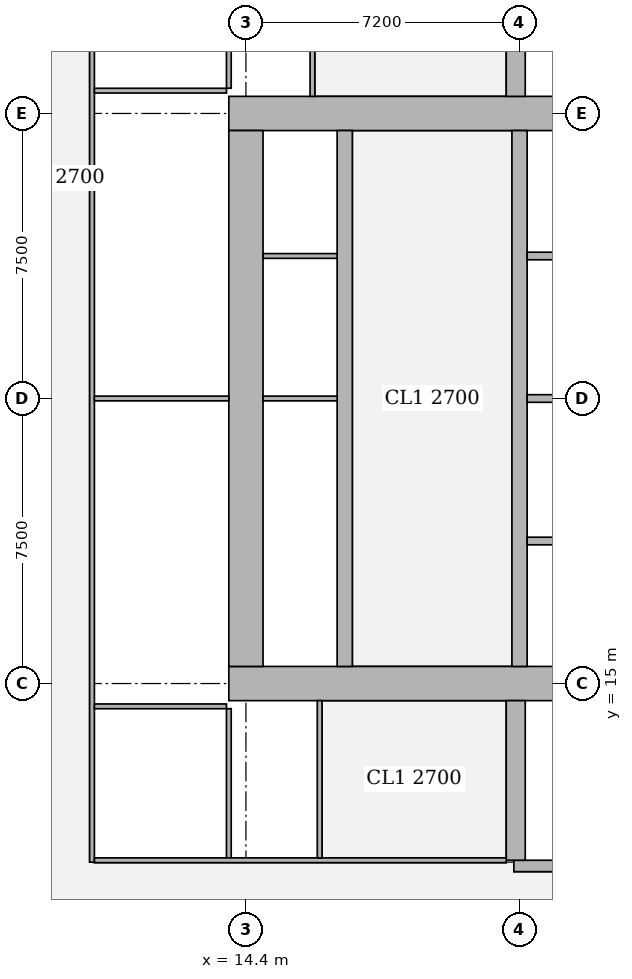
"""IFC4 building model, lengths in metres.
Left out: names, types, materials, properties, quantities, classifications, styles, units other than length and angle.
Written with IfcOpenShell. Run it as: python <this file> out.ifc"""

import sys

from ifc_helpers import new_model, si_unit, direction, frame, frame_2d, origin, place, context, subcontext, project, spatial, rectangle, extrude, element, fill, save


model = new_model("IFC4")
c1 = context("Model", 3, precision=1e-05, world=origin(), true_north=direction((0.0, 1.0)))
c2 = subcontext(c1, "Body", "Model", "MODEL_VIEW")
j1 = project(units=[si_unit("LENGTHUNIT", "METRE"), si_unit("PLANEANGLEUNIT", "RADIAN")], contexts=[c1])
p1 = place(None, origin())
s1 = spatial("IfcSite", under=j1, at=p1, CompositionType="ELEMENT")
p2 = place(p1, origin())
s2 = spatial("IfcBuilding", under=s1, at=p2, CompositionType="ELEMENT")
p3 = place(p2, frame((0.0, 0.0, 180.8)))
s3 = spatial("IfcBuildingStorey", under=s2, at=p3, CompositionType="ELEMENT", Elevation=180.8)
p4 = place(p3, frame((13.95, 15.0, 0.0), z_axis=(0.0, 0.0, 1.0), x_axis=(1.0, 0.0, 0.0)))
e1 = element("IfcWall", 1, at=p4, inside=s3, PredefinedType="SHEAR", context=c2, shape_type="SweptSolid", body=[
    extrude(rectangle(XDim=15.3, YDim=0.9, at=frame_2d((7.65, 0.0))), origin(), (0.0, 0.0, 1.0), 3.75),
])
p5 = place(p4, frame((4.45, 0.0, 0.0)))
e2 = element("IfcOpeningElement", 2, at=p5, cuts=e1, PredefinedType="OPENING", context=c2, shape_type="SweptSolid", body=[
    extrude(rectangle(XDim=1.8, YDim=2.1, at=frame_2d((0.9, 1.05))), frame((0.0, 0.46, 0.0), z_axis=(0.0, -1.0, 0.0), x_axis=(1.0, 0.0, 0.0)), (0.0, 0.0, 1.0), 0.92),
])
p6 = place(p4, frame((10.7, 0.0, 0.0)))
e3 = element("IfcOpeningElement", 3, at=p6, cuts=e1, PredefinedType="OPENING", context=c2, shape_type="SweptSolid", body=[
    extrude(rectangle(XDim=1.1, YDim=2.1, at=frame_2d((0.55, 1.05))), frame((0.0, 0.46, 0.0), z_axis=(0.0, -1.0, 0.0), x_axis=(1.0, 0.0, 0.0)), (0.0, 0.0, 1.0), 0.92),
])
p7 = place(p3, frame((13.95, 30.0, 0.0), z_axis=(0.0, 0.0, 1.0), x_axis=(1.0, 0.0, 0.0)))
e4 = element("IfcWall", 4, at=p7, inside=s3, PredefinedType="SHEAR", context=c2, shape_type="SweptSolid", body=[
    extrude(rectangle(XDim=15.3, YDim=0.9, at=frame_2d((7.65, 0.0))), origin(), (0.0, 0.0, 1.0), 3.75),
])
p8 = place(p7, frame((4.45, 0.0, 0.0)))
e5 = element("IfcOpeningElement", 5, at=p8, cuts=e4, PredefinedType="OPENING", context=c2, shape_type="SweptSolid", body=[
    extrude(rectangle(XDim=1.8, YDim=2.1, at=frame_2d((0.9, 1.05))), frame((0.0, 0.46, 0.0), z_axis=(0.0, -1.0, 0.0), x_axis=(1.0, 0.0, 0.0)), (0.0, 0.0, 1.0), 0.92),
])
p9 = place(p7, frame((10.7, 0.0, 0.0)))
e6 = element("IfcOpeningElement", 6, at=p9, cuts=e4, PredefinedType="OPENING", context=c2, shape_type="SweptSolid", body=[
    extrude(rectangle(XDim=1.1, YDim=2.1, at=frame_2d((0.55, 1.05))), frame((0.0, 0.46, 0.0), z_axis=(0.0, -1.0, 0.0), x_axis=(1.0, 0.0, 0.0)), (0.0, 0.0, 1.0), 0.92),
])
p10 = place(p3, frame((14.4, 15.45, 0.0), z_axis=(0.0, 0.0, 1.0), x_axis=(0.0, 1.0, 0.0)))
e7 = element("IfcWall", 7, at=p10, inside=s3, PredefinedType="SHEAR", context=c2, shape_type="SweptSolid", body=[
    extrude(rectangle(XDim=14.1, YDim=0.9, at=frame_2d((7.05, 0.0))), origin(), (0.0, 0.0, 1.0), 3.75),
])
p11 = place(p3, frame((17.0, 15.45, 0.0), z_axis=(0.0, 0.0, 1.0), x_axis=(0.0, 1.0, 0.0)))
e8 = element("IfcWall", 8, at=p11, inside=s3, PredefinedType="SHEAR", context=c2, shape_type="SweptSolid", body=[
    extrude(rectangle(XDim=14.1, YDim=0.4, at=frame_2d((7.05, 0.0))), origin(), (0.0, 0.0, 1.0), 3.75),
])
p12 = place(p11, frame((0.925, 0.0, 0.0)))
e9 = element("IfcOpeningElement", 9, at=p12, cuts=e8, PredefinedType="OPENING", context=c2, shape_type="SweptSolid", body=[
    extrude(rectangle(XDim=1.0, YDim=2.1, at=frame_2d((0.5, 1.05))), frame((0.0, 0.21, 0.0), z_axis=(0.0, -1.0, 0.0), x_axis=(1.0, 0.0, 0.0)), (0.0, 0.0, 1.0), 0.42),
])
p13 = place(p11, frame((4.675, 0.0, 0.0)))
e10 = element("IfcOpeningElement", 10, at=p13, cuts=e8, PredefinedType="OPENING", context=c2, shape_type="SweptSolid", body=[
    extrude(rectangle(XDim=1.0, YDim=2.1, at=frame_2d((0.5, 1.05))), frame((0.0, 0.21, 0.0), z_axis=(0.0, -1.0, 0.0), x_axis=(1.0, 0.0, 0.0)), (0.0, 0.0, 1.0), 0.42),
])
p14 = place(p11, frame((8.425, 0.0, 0.0)))
e11 = element("IfcOpeningElement", 11, at=p14, cuts=e8, PredefinedType="OPENING", context=c2, shape_type="SweptSolid", body=[
    extrude(rectangle(XDim=1.0, YDim=2.1, at=frame_2d((0.5, 1.05))), frame((0.0, 0.21, 0.0), z_axis=(0.0, -1.0, 0.0), x_axis=(1.0, 0.0, 0.0)), (0.0, 0.0, 1.0), 0.42),
])
p15 = place(p11, frame((12.175, 0.0, 0.0)))
e12 = element("IfcOpeningElement", 12, at=p15, cuts=e8, PredefinedType="OPENING", context=c2, shape_type="SweptSolid", body=[
    extrude(rectangle(XDim=1.0, YDim=2.1, at=frame_2d((0.5, 1.05))), frame((0.0, 0.21, 0.0), z_axis=(0.0, -1.0, 0.0), x_axis=(1.0, 0.0, 0.0)), (0.0, 0.0, 1.0), 0.42),
])
p16 = place(p3, frame((21.6, 15.45, 0.0), z_axis=(0.0, 0.0, 1.0), x_axis=(0.0, 1.0, 0.0)))
e13 = element("IfcWall", 13, at=p16, inside=s3, PredefinedType="SHEAR", context=c2, shape_type="SweptSolid", body=[
    extrude(rectangle(XDim=14.1, YDim=0.4, at=frame_2d((7.05, 0.0))), origin(), (0.0, 0.0, 1.0), 3.75),
])
p17 = place(p16, frame((0.875, 0.0, 0.0)))
e14 = element("IfcOpeningElement", 14, at=p17, cuts=e13, PredefinedType="OPENING", context=c2, shape_type="SweptSolid", body=[
    extrude(rectangle(XDim=1.1, YDim=2.1, at=frame_2d((0.55, 1.05))), frame((0.0, 0.21, 0.0), z_axis=(0.0, -1.0, 0.0), x_axis=(1.0, 0.0, 0.0)), (0.0, 0.0, 1.0), 0.42),
])
p18 = place(p16, frame((4.625, 0.0, 0.0)))
e15 = element("IfcOpeningElement", 15, at=p18, cuts=e13, PredefinedType="OPENING", context=c2, shape_type="SweptSolid", body=[
    extrude(rectangle(XDim=1.1, YDim=2.1, at=frame_2d((0.55, 1.05))), frame((0.0, 0.21, 0.0), z_axis=(0.0, -1.0, 0.0), x_axis=(1.0, 0.0, 0.0)), (0.0, 0.0, 1.0), 0.42),
])
p19 = place(p16, frame((8.375, 0.0, 0.0)))
e16 = element("IfcOpeningElement", 16, at=p19, cuts=e13, PredefinedType="OPENING", context=c2, shape_type="SweptSolid", body=[
    extrude(rectangle(XDim=1.1, YDim=2.1, at=frame_2d((0.55, 1.05))), frame((0.0, 0.21, 0.0), z_axis=(0.0, -1.0, 0.0), x_axis=(1.0, 0.0, 0.0)), (0.0, 0.0, 1.0), 0.42),
])
p20 = place(p16, frame((12.125, 0.0, 0.0)))
e17 = element("IfcOpeningElement", 17, at=p20, cuts=e13, PredefinedType="OPENING", context=c2, shape_type="SweptSolid", body=[
    extrude(rectangle(XDim=1.1, YDim=2.1, at=frame_2d((0.55, 1.05))), frame((0.0, 0.21, 0.0), z_axis=(0.0, -1.0, 0.0), x_axis=(1.0, 0.0, 0.0)), (0.0, 0.0, 1.0), 0.42),
])
p21 = place(p3, frame((21.45, 10.2, 0.0), z_axis=(0.0, 0.0, 1.0), x_axis=(1.0, 0.0, 0.0)))
e18 = element("IfcWall", 18, at=p21, inside=s3, PredefinedType="SHEAR", context=c2, shape_type="SweptSolid", body=[
    extrude(rectangle(XDim=7.5, YDim=0.3, at=frame_2d((3.75, 0.0))), origin(), (0.0, 0.0, 1.0), 3.75),
])
p22 = place(p21, frame((0.5, 0.0, 0.0)))
e19 = element("IfcOpeningElement", 19, at=p22, cuts=e18, PredefinedType="OPENING", context=c2, shape_type="SweptSolid", body=[
    extrude(rectangle(XDim=1.1, YDim=2.1, at=frame_2d((0.55, 1.05))), frame((0.0, 0.16, 0.0), z_axis=(0.0, -1.0, 0.0), x_axis=(1.0, 0.0, 0.0)), (0.0, 0.0, 1.0), 0.32),
])
for number, where, z_axis, x_axis in (
    (20, (21.5, 10.35, 0.0), (0.0, 0.0, 1.0), (0.0, 1.0, 0.0)),
    (21, (21.5, 30.45, 0.0), (0.0, 0.0, 1.0), (0.0, 1.0, 0.0)),
):
    element("IfcWall", number, at=place(p3, frame(where, z_axis=z_axis, x_axis=x_axis)), inside=s3, PredefinedType="SHEAR", context=c2, shape_type="SweptSolid", body=[
        extrude(rectangle(XDim=4.2, YDim=0.5, at=frame_2d((2.1, 0.0))), origin(), (0.0, 0.0, 1.0), 3.75),
    ])
p23 = place(p3, frame((10.35, 10.3, 0.0), z_axis=(0.0, 0.0, 1.0), x_axis=(0.0, 1.0, 0.0)))
e22 = element("IfcWall", 22, at=p23, inside=s3, PredefinedType="PARTITIONING", context=c2, shape_type="SweptSolid", body=[
    extrude(rectangle(XDim=24.4, YDim=0.125, at=frame_2d((12.2, 0.0))), origin(), (0.0, 0.0, 1.0), 3.5),
])
p24 = place(p23, frame((1.55, 0.0, 0.0)))
e23 = element("IfcOpeningElement", 23, at=p24, cuts=e22, PredefinedType="OPENING", context=c2, shape_type="SweptSolid", body=[
    extrude(rectangle(XDim=1.0, YDim=2.1, at=frame_2d((0.5, 1.05))), frame((0.0, 0.073, 0.0), z_axis=(0.0, -1.0, 0.0), x_axis=(1.0, 0.0, 0.0)), (0.0, 0.0, 1.0), 0.145),
])
p25 = place(p23, frame((7.65, 0.0, 0.0)))
e24 = element("IfcOpeningElement", 24, at=p25, cuts=e22, PredefinedType="OPENING", context=c2, shape_type="SweptSolid", body=[
    extrude(rectangle(XDim=1.0, YDim=2.1, at=frame_2d((0.5, 1.05))), frame((0.0, 0.073, 0.0), z_axis=(0.0, -1.0, 0.0), x_axis=(1.0, 0.0, 0.0)), (0.0, 0.0, 1.0), 0.145),
])
p26 = place(p23, frame((15.75, 0.0, 0.0)))
e25 = element("IfcOpeningElement", 25, at=p26, cuts=e22, PredefinedType="OPENING", context=c2, shape_type="SweptSolid", body=[
    extrude(rectangle(XDim=1.0, YDim=2.1, at=frame_2d((0.5, 1.05))), frame((0.0, 0.073, 0.0), z_axis=(0.0, -1.0, 0.0), x_axis=(1.0, 0.0, 0.0)), (0.0, 0.0, 1.0), 0.145),
])
p27 = place(p23, frame((21.85, 0.0, 0.0)))
e26 = element("IfcOpeningElement", 26, at=p27, cuts=e22, PredefinedType="OPENING", context=c2, shape_type="SweptSolid", body=[
    extrude(rectangle(XDim=1.0, YDim=2.1, at=frame_2d((0.5, 1.05))), frame((0.0, 0.073, 0.0), z_axis=(0.0, -1.0, 0.0), x_axis=(1.0, 0.0, 0.0)), (0.0, 0.0, 1.0), 0.145),
])
p28 = place(p3, frame((10.413, 14.4, 0.0), z_axis=(0.0, 0.0, 1.0), x_axis=(1.0, 0.0, 0.0)))
e27 = element("IfcWall", 27, at=p28, inside=s3, PredefinedType="PARTITIONING", context=c2, shape_type="SweptSolid", body=[
    extrude(rectangle(XDim=3.475, YDim=0.125, at=frame_2d((1.737, 0.0))), origin(), (0.0, 0.0, 1.0), 3.5),
])
p29 = place(p3, frame((10.413, 22.5, 0.0), z_axis=(0.0, 0.0, 1.0), x_axis=(1.0, 0.0, 0.0)))
e28 = element("IfcWall", 28, at=p29, inside=s3, PredefinedType="PARTITIONING", context=c2, shape_type="SweptSolid", body=[
    extrude(rectangle(XDim=3.537, YDim=0.125, at=frame_2d((1.769, 0.0))), origin(), (0.0, 0.0, 1.0), 3.5),
])
p30 = place(p3, frame((10.413, 30.6, 0.0), z_axis=(0.0, 0.0, 1.0), x_axis=(1.0, 0.0, 0.0)))
e29 = element("IfcWall", 29, at=p30, inside=s3, PredefinedType="PARTITIONING", context=c2, shape_type="SweptSolid", body=[
    extrude(rectangle(XDim=3.475, YDim=0.125, at=frame_2d((1.737, 0.0))), origin(), (0.0, 0.0, 1.0), 3.5),
])
p31 = place(p3, frame((13.95, 10.413, 0.0), z_axis=(0.0, 0.0, 1.0), x_axis=(0.0, 1.0, 0.0)))
e30 = element("IfcWall", 30, at=p31, inside=s3, PredefinedType="PARTITIONING", context=c2, shape_type="SweptSolid", body=[
    extrude(rectangle(XDim=3.925, YDim=0.125, at=frame_2d((1.962, 0.0))), origin(), (0.0, 0.0, 1.0), 3.5),
])
p32 = place(p3, frame((13.95, 30.663, 0.0), z_axis=(0.0, 0.0, 1.0), x_axis=(0.0, 1.0, 0.0)))
e31 = element("IfcWall", 31, at=p32, inside=s3, PredefinedType="PARTITIONING", context=c2, shape_type="SweptSolid", body=[
    extrude(rectangle(XDim=3.924, YDim=0.125, at=frame_2d((1.962, 0.0))), origin(), (0.0, 0.0, 1.0), 3.5),
])
p33 = place(p3, frame((10.413, 10.35, 0.0), z_axis=(0.0, 0.0, 1.0), x_axis=(1.0, 0.0, 0.0)))
e32 = element("IfcWall", 32, at=p33, inside=s3, PredefinedType="PARTITIONING", context=c2, shape_type="SweptSolid", body=[
    extrude(rectangle(XDim=10.837, YDim=0.125, at=frame_2d((5.418, 0.0))), origin(), (0.0, 0.0, 1.0), 3.5),
])
p34 = place(p33, frame((7.582, 0.0, 0.0)))
e33 = element("IfcOpeningElement", 33, at=p34, cuts=e32, PredefinedType="OPENING", context=c2, shape_type="SweptSolid", body=[
    extrude(rectangle(XDim=1.8, YDim=2.1, at=frame_2d((0.9, 1.05))), frame((0.0, 0.073, 0.0), z_axis=(0.0, -1.0, 0.0), x_axis=(1.0, 0.0, 0.0)), (0.0, 0.0, 1.0), 0.145),
])
p35 = place(p3, frame((16.34, 10.413, 0.0), z_axis=(0.0, 0.0, 1.0), x_axis=(0.0, 1.0, 0.0)))
e34 = element("IfcWall", 34, at=p35, inside=s3, PredefinedType="PARTITIONING", context=c2, shape_type="SweptSolid", body=[
    extrude(rectangle(XDim=4.137, YDim=0.125, at=frame_2d((2.068, 0.0))), origin(), (0.0, 0.0, 1.0), 3.5),
])
p36 = place(p35, frame((1.512, 0.0, 0.0)))
e35 = element("IfcOpeningElement", 35, at=p36, cuts=e34, PredefinedType="OPENING", context=c2, shape_type="SweptSolid", body=[
    extrude(rectangle(XDim=1.0, YDim=2.1, at=frame_2d((0.5, 1.05))), frame((0.0, 0.073, 0.0), z_axis=(0.0, -1.0, 0.0), x_axis=(1.0, 0.0, 0.0)), (0.0, 0.0, 1.0), 0.145),
])
p37 = place(p3, frame((16.15, 30.45, 0.0), z_axis=(0.0, 0.0, 1.0), x_axis=(0.0, 1.0, 0.0)))
e36 = element("IfcWall", 36, at=p37, inside=s3, PredefinedType="PARTITIONING", context=c2, shape_type="SweptSolid", body=[
    extrude(rectangle(XDim=4.137, YDim=0.125, at=frame_2d((2.068, 0.0))), origin(), (0.0, 0.0, 1.0), 3.5),
])
p38 = place(p37, frame((1.625, 0.0, 0.0)))
e37 = element("IfcOpeningElement", 37, at=p38, cuts=e36, PredefinedType="OPENING", context=c2, shape_type="SweptSolid", body=[
    extrude(rectangle(XDim=1.0, YDim=2.1, at=frame_2d((0.5, 1.05))), frame((0.0, 0.073, 0.0), z_axis=(0.0, -1.0, 0.0), x_axis=(1.0, 0.0, 0.0)), (0.0, 0.0, 1.0), 0.145),
])
for number, where, z_axis, x_axis in (
    (38, (14.85, 22.5, 0.0), (0.0, 0.0, 1.0), (1.0, 0.0, 0.0)),
    (39, (14.85, 26.25, 0.0), (0.0, 0.0, 1.0), (1.0, 0.0, 0.0)),
):
    element("IfcWall", number, at=place(p3, frame(where, z_axis=z_axis, x_axis=x_axis)), inside=s3, PredefinedType="PARTITIONING", context=c2, shape_type="SweptSolid", body=[
        extrude(rectangle(XDim=1.95, YDim=0.125, at=frame_2d((0.975, 0.0))), origin(), (0.0, 0.0, 1.0), 3.5),
    ])
for number, where, z_axis, x_axis in (
    (40, (21.8, 18.75, 0.0), (0.0, 0.0, 1.0), (1.0, 0.0, 0.0)),
    (41, (21.8, 22.5, 0.0), (0.0, 0.0, 1.0), (1.0, 0.0, 0.0)),
    (42, (21.8, 26.25, 0.0), (0.0, 0.0, 1.0), (1.0, 0.0, 0.0)),
):
    element("IfcWall", number, at=place(p3, frame(where, z_axis=z_axis, x_axis=x_axis)), inside=s3, PredefinedType="SOLIDWALL", context=c2, shape_type="SweptSolid", body=[
        extrude(rectangle(XDim=2.2, YDim=0.2, at=frame_2d((1.1, 0.0))), origin(), (0.0, 0.0, 1.0), 3.5),
    ])
p39 = place(p24, origin())
e43 = element("IfcDoor", 43, at=p39, inside=s3, OperationType="SINGLE_SWING_RIGHT", PredefinedType="DOOR", context=c2, shape_type="SweptSolid", body=[
    extrude(rectangle(XDim=1.0, YDim=2.1, at=frame_2d((0.5, 1.05))), frame((0.0, 0.025, 0.0), z_axis=(0.0, -1.0, 0.0), x_axis=(1.0, 0.0, 0.0)), (0.0, 0.0, 1.0), 0.05),
])
fill(e23, e43)
p40 = place(p25, origin())
e44 = element("IfcDoor", 44, at=p40, inside=s3, OperationType="SINGLE_SWING_LEFT", PredefinedType="DOOR", context=c2, shape_type="SweptSolid", body=[
    extrude(rectangle(XDim=1.0, YDim=2.1, at=frame_2d((0.5, 1.05))), frame((0.0, 0.025, 0.0), z_axis=(0.0, -1.0, 0.0), x_axis=(1.0, 0.0, 0.0)), (0.0, 0.0, 1.0), 0.05),
])
fill(e24, e44)
p41 = place(p26, origin())
e45 = element("IfcDoor", 45, at=p41, inside=s3, OperationType="SINGLE_SWING_LEFT", PredefinedType="DOOR", context=c2, shape_type="SweptSolid", body=[
    extrude(rectangle(XDim=1.0, YDim=2.1, at=frame_2d((0.5, 1.05))), frame((0.0, 0.025, 0.0), z_axis=(0.0, -1.0, 0.0), x_axis=(1.0, 0.0, 0.0)), (0.0, 0.0, 1.0), 0.05),
])
fill(e25, e45)
p42 = place(p36, origin())
e46 = element("IfcDoor", 46, at=p42, inside=s3, OperationType="SINGLE_SWING_LEFT", PredefinedType="DOOR", context=c2, shape_type="SweptSolid", body=[
    extrude(rectangle(XDim=1.0, YDim=2.1, at=frame_2d((0.5, 1.05))), frame((0.0, 0.025, 0.0), z_axis=(0.0, -1.0, 0.0), x_axis=(1.0, 0.0, 0.0)), (0.0, 0.0, 1.0), 0.05),
])
fill(e35, e46)
p43 = place(p34, origin())
e47 = element("IfcDoor", 47, at=p43, inside=s3, OperationType="DOUBLE_DOOR_SINGLE_SWING", PredefinedType="DOOR", context=c2, shape_type="SweptSolid", body=[
    extrude(rectangle(XDim=1.8, YDim=2.1, at=frame_2d((0.9, 1.05))), frame((0.0, 0.025, 0.0), z_axis=(0.0, -1.0, 0.0), x_axis=(1.0, 0.0, 0.0)), (0.0, 0.0, 1.0), 0.05),
])
fill(e33, e47)
p44 = place(p12, origin())
e48 = element("IfcDoor", 48, at=p44, inside=s3, OperationType="SINGLE_SWING_LEFT", PredefinedType="DOOR", context=c2, shape_type="SweptSolid", body=[
    extrude(rectangle(XDim=1.0, YDim=2.1, at=frame_2d((0.5, 1.05))), frame((0.0, 0.025, 0.0), z_axis=(0.0, -1.0, 0.0), x_axis=(1.0, 0.0, 0.0)), (0.0, 0.0, 1.0), 0.05),
])
fill(e9, e48)
p45 = place(p13, origin())
e49 = element("IfcDoor", 49, at=p45, inside=s3, OperationType="SINGLE_SWING_RIGHT", PredefinedType="DOOR", context=c2, shape_type="SweptSolid", body=[
    extrude(rectangle(XDim=1.0, YDim=2.1, at=frame_2d((0.5, 1.05))), frame((0.0, 0.025, 0.0), z_axis=(0.0, -1.0, 0.0), x_axis=(1.0, 0.0, 0.0)), (0.0, 0.0, 1.0), 0.05),
])
fill(e10, e49)
p46 = place(p14, origin())
e50 = element("IfcDoor", 50, at=p46, inside=s3, OperationType="SINGLE_SWING_LEFT", PredefinedType="DOOR", context=c2, shape_type="SweptSolid", body=[
    extrude(rectangle(XDim=1.0, YDim=2.1, at=frame_2d((0.5, 1.05))), frame((0.0, 0.025, 0.0), z_axis=(0.0, -1.0, 0.0), x_axis=(1.0, 0.0, 0.0)), (0.0, 0.0, 1.0), 0.05),
])
fill(e11, e50)
p47 = place(p15, origin())
e51 = element("IfcDoor", 51, at=p47, inside=s3, OperationType="SINGLE_SWING_RIGHT", PredefinedType="DOOR", context=c2, shape_type="SweptSolid", body=[
    extrude(rectangle(XDim=1.0, YDim=2.1, at=frame_2d((0.5, 1.05))), frame((0.0, 0.025, 0.0), z_axis=(0.0, -1.0, 0.0), x_axis=(1.0, 0.0, 0.0)), (0.0, 0.0, 1.0), 0.05),
])
fill(e12, e51)
p48 = place(p5, origin())
e52 = element("IfcDoor", 52, at=p48, inside=s3, OperationType="DOUBLE_DOOR_SINGLE_SWING", PredefinedType="DOOR", context=c2, shape_type="SweptSolid", body=[
    extrude(rectangle(XDim=1.8, YDim=2.1, at=frame_2d((0.9, 1.05))), frame((0.0, 0.025, 0.0), z_axis=(0.0, -1.0, 0.0), x_axis=(1.0, 0.0, 0.0)), (0.0, 0.0, 1.0), 0.05),
])
fill(e2, e52)
p49 = place(p8, origin())
e53 = element("IfcDoor", 53, at=p49, inside=s3, OperationType="DOUBLE_DOOR_SINGLE_SWING", PredefinedType="DOOR", context=c2, shape_type="SweptSolid", body=[
    extrude(rectangle(XDim=1.8, YDim=2.1, at=frame_2d((0.9, 1.05))), frame((0.0, 0.025, 0.0), z_axis=(0.0, -1.0, 0.0), x_axis=(1.0, 0.0, 0.0)), (0.0, 0.0, 1.0), 0.05),
])
fill(e5, e53)
p50 = place(p17, origin())
e54 = element("IfcDoor", 54, at=p50, inside=s3, OperationType="DOUBLE_DOOR_SLIDING", PredefinedType="DOOR", context=c2, shape_type="SweptSolid", body=[
    extrude(rectangle(XDim=1.1, YDim=2.1, at=frame_2d((0.55, 1.05))), frame((0.0, 0.025, 0.0), z_axis=(0.0, -1.0, 0.0), x_axis=(1.0, 0.0, 0.0)), (0.0, 0.0, 1.0), 0.05),
])
fill(e14, e54)
p51 = place(p18, origin())
e55 = element("IfcDoor", 55, at=p51, inside=s3, OperationType="DOUBLE_DOOR_SLIDING", PredefinedType="DOOR", context=c2, shape_type="SweptSolid", body=[
    extrude(rectangle(XDim=1.1, YDim=2.1, at=frame_2d((0.55, 1.05))), frame((0.0, 0.025, 0.0), z_axis=(0.0, -1.0, 0.0), x_axis=(1.0, 0.0, 0.0)), (0.0, 0.0, 1.0), 0.05),
])
fill(e15, e55)
p52 = place(p19, origin())
e56 = element("IfcDoor", 56, at=p52, inside=s3, OperationType="DOUBLE_DOOR_SLIDING", PredefinedType="DOOR", context=c2, shape_type="SweptSolid", body=[
    extrude(rectangle(XDim=1.1, YDim=2.1, at=frame_2d((0.55, 1.05))), frame((0.0, 0.025, 0.0), z_axis=(0.0, -1.0, 0.0), x_axis=(1.0, 0.0, 0.0)), (0.0, 0.0, 1.0), 0.05),
])
fill(e16, e56)
p53 = place(p20, origin())
e57 = element("IfcDoor", 57, at=p53, inside=s3, OperationType="DOUBLE_DOOR_SLIDING", PredefinedType="DOOR", context=c2, shape_type="SweptSolid", body=[
    extrude(rectangle(XDim=1.1, YDim=2.1, at=frame_2d((0.55, 1.05))), frame((0.0, 0.025, 0.0), z_axis=(0.0, -1.0, 0.0), x_axis=(1.0, 0.0, 0.0)), (0.0, 0.0, 1.0), 0.05),
])
fill(e17, e57)
p54 = place(p22, origin())
e58 = element("IfcDoor", 58, at=p54, inside=s3, OperationType="SINGLE_SWING_LEFT", PredefinedType="DOOR", context=c2, shape_type="SweptSolid", body=[
    extrude(rectangle(XDim=1.1, YDim=2.1, at=frame_2d((0.55, 1.05))), frame((0.0, 0.025, 0.0), z_axis=(0.0, -1.0, 0.0), x_axis=(1.0, 0.0, 0.0)), (0.0, 0.0, 1.0), 0.05),
])
fill(e19, e58)
save(model, sys.argv[1])
